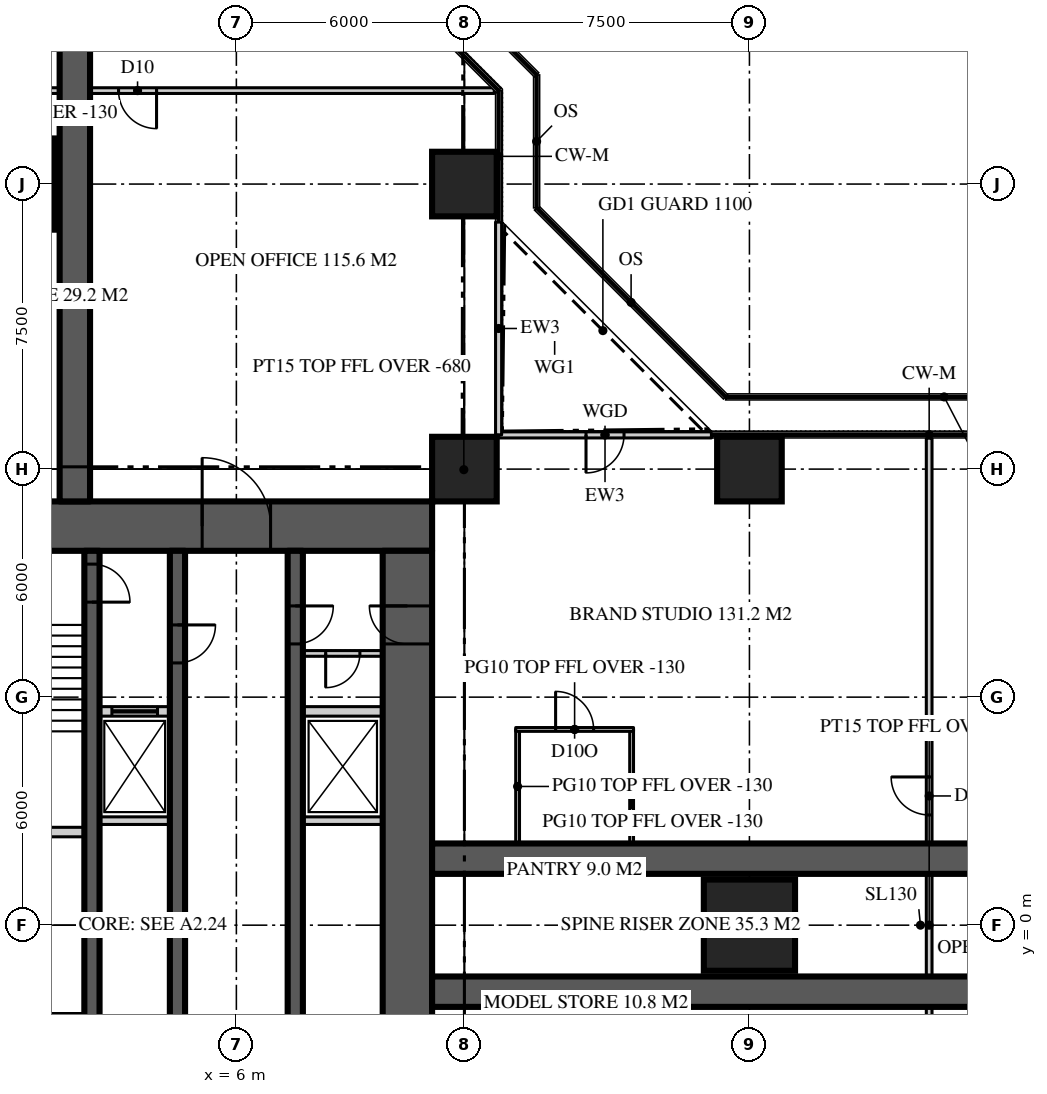
"""IFC4 building model, lengths in metres.
Left out: names, types, materials, properties, quantities, classifications, styles, units other than length and angle.
Written with IfcOpenShell. Run it as: python <this file> out.ifc"""

import sys

from ifc_helpers import new_model, si_unit, direction, frame, frame_2d, origin, origin_2d, place, context, subcontext, project, spatial, rectangle, extrude, element, fill, save


model = new_model("IFC4")
c1 = context("Model", 3, precision=1e-05, world=origin(), true_north=direction((0.0, 1.0)))
c2 = subcontext(c1, "Body", "Model", "MODEL_VIEW")
j1 = project(units=[si_unit("LENGTHUNIT", "METRE"), si_unit("PLANEANGLEUNIT", "RADIAN")], contexts=[c1])
p1 = place(None, origin())
s1 = spatial("IfcSite", under=j1, at=p1, CompositionType="ELEMENT")
p2 = place(p1, origin())
s2 = spatial("IfcBuilding", under=s1, at=p2, CompositionType="ELEMENT")
p3 = place(p2, frame((0.0, 0.0, 186.6)))
s3 = spatial("IfcBuildingStorey", under=s2, at=p3, CompositionType="ELEMENT", Elevation=186.6)
p4 = place(p3, frame((-11.15, 10.5, 0.0), z_axis=(0.0, 0.0, 1.0), x_axis=(1.0, 0.0, 0.0)))
e1 = element("IfcWall", 1, at=p4, inside=s3, PredefinedType="SHEAR", context=c2, shape_type="SweptSolid", body=[
    extrude(rectangle(XDim=22.3, YDim=1.3, at=frame_2d((11.15, 0.0))), origin(), (0.0, 0.0, 1.0), 3.9),
])
p5 = place(p4, frame((4.25, 0.0, 0.0)))
e2 = element("IfcOpeningElement", 2, at=p5, cuts=e1, PredefinedType="OPENING", context=c2, shape_type="SweptSolid", body=[
    extrude(rectangle(XDim=1.8, YDim=2.2, at=frame_2d((0.9, 1.1))), frame((0.0, 0.66, 0.0), z_axis=(0.0, -1.0, 0.0), x_axis=(1.0, 0.0, 0.0)), (0.0, 0.0, 1.0), 1.32),
])
p6 = place(p4, frame((16.25, 0.0, 0.0)))
e3 = element("IfcOpeningElement", 3, at=p6, cuts=e1, PredefinedType="OPENING", context=c2, shape_type="SweptSolid", body=[
    extrude(rectangle(XDim=1.8, YDim=2.2, at=frame_2d((0.9, 1.1))), frame((0.0, 0.66, 0.0), z_axis=(0.0, -1.0, 0.0), x_axis=(1.0, 0.0, 0.0)), (0.0, 0.0, 1.0), 1.32),
])
p7 = place(p3, frame((10.5, -9.85, 0.0), z_axis=(0.0, 0.0, 1.0), x_axis=(0.0, 1.0, 0.0)))
e4 = element("IfcWall", 4, at=p7, inside=s3, PredefinedType="SHEAR", context=c2, shape_type="SweptSolid", body=[
    extrude(rectangle(XDim=19.7, YDim=1.3, at=frame_2d((9.85, 0.0))), origin(), (0.0, 0.0, 1.0), 3.9),
])
p8 = place(p7, frame((17.25, 0.0, 0.0)))
e5 = element("IfcOpeningElement", 5, at=p8, cuts=e4, PredefinedType="OPENING", context=c2, shape_type="SweptSolid", body=[
    extrude(rectangle(XDim=1.0, YDim=2.2, at=frame_2d((0.5, 1.1))), frame((0.0, 0.66, 0.0), z_axis=(0.0, -1.0, 0.0), x_axis=(1.0, 0.0, 0.0)), (0.0, 0.0, 1.0), 1.32),
])
for number, where, z_axis, x_axis in (
    (6, (11.15, -1.75, 0.0), (0.0, 0.0, 1.0), (1.0, 0.0, 0.0)),
    (7, (11.15, 1.75, 0.0), (0.0, 0.0, 1.0), (1.0, 0.0, 0.0)),
    (8, (1.75, 11.15, 0.0), (0.0, 0.0, 1.0), (0.0, 1.0, 0.0)),
):
    element("IfcWall", number, at=place(p3, frame(where, z_axis=z_axis, x_axis=x_axis)), inside=s3, PredefinedType="SHEAR", context=c2, shape_type="SweptSolid", body=[
        extrude(rectangle(XDim=15.25, YDim=0.8, at=frame_2d((7.625, 0.0))), origin(), (0.0, 0.0, 1.0), 3.9),
    ])
p9 = place(p3, frame((19.5, 0.0, 0.0), z_axis=(0.0, 0.0, 1.0), x_axis=(1.0, 0.0, 0.0)))
e9 = element("IfcColumn", 9, at=p9, inside=s3, PredefinedType="COLUMN", context=c2, shape_type="SweptSolid", body=[
    extrude(rectangle(XDim=2.4, YDim=2.4, at=origin_2d()), origin(), (0.0, 0.0, 1.0), 3.9),
])
for number, where, z_axis, x_axis in (
    (10, (12.0, 12.0, 0.0), (0.0, 0.0, 1.0), (1.0, 0.0, 0.0)),
    (11, (19.5, 12.0, 0.0), (0.0, 0.0, 1.0), (1.0, 0.0, 0.0)),
):
    element("IfcColumn", number, at=place(p3, frame(where, z_axis=z_axis, x_axis=x_axis)), inside=s3, PredefinedType="COLUMN", context=c2, shape_type="SweptSolid", body=[
        extrude(rectangle(XDim=1.7, YDim=1.7, at=origin_2d()), origin(), (0.0, 0.0, 1.0), 3.9),
    ])
p10 = place(p3, frame((0.0, 19.5, 0.0), z_axis=(0.0, 0.0, 1.0), x_axis=(1.0, 0.0, 0.0)))
e12 = element("IfcColumn", 12, at=p10, inside=s3, PredefinedType="COLUMN", context=c2, shape_type="SweptSolid", body=[
    extrude(rectangle(XDim=2.4, YDim=2.4, at=origin_2d()), origin(), (0.0, 0.0, 1.0), 3.9),
])
p11 = place(p3, frame((12.0, 19.5, 0.0), z_axis=(0.0, 0.0, 1.0), x_axis=(1.0, 0.0, 0.0)))
e13 = element("IfcColumn", 13, at=p11, inside=s3, PredefinedType="COLUMN", context=c2, shape_type="SweptSolid", body=[
    extrude(rectangle(XDim=1.7, YDim=1.7, at=origin_2d()), origin(), (0.0, 0.0, 1.0), 3.9),
])
p12 = place(p3, frame((18.5, 12.9, 0.0), z_axis=(0.0, 0.0, 1.0), x_axis=(-1.0, 0.0, 0.0)))
e14 = element("IfcWall", 14, at=p12, inside=s3, PredefinedType="SOLIDWALL", context=c2, shape_type="SweptSolid", body=[
    extrude(rectangle(XDim=5.6, YDim=0.16, at=frame_2d((2.8, 0.0))), origin(), (0.0, 0.0, 1.0), 3.77),
])
p13 = place(p12, frame((2.3, 0.0, 0.0)))
e15 = element("IfcOpeningElement", 15, at=p13, cuts=e14, PredefinedType="OPENING", context=c2, shape_type="SweptSolid", body=[
    extrude(rectangle(XDim=1.0, YDim=2.2, at=frame_2d((0.5, 1.1))), frame((0.0, 0.09, 0.0), z_axis=(0.0, -1.0, 0.0), x_axis=(1.0, 0.0, 0.0)), (0.0, 0.0, 1.0), 0.18),
])
p14 = place(p3, frame((12.9, 12.9, 0.0), z_axis=(0.0, 0.0, 1.0), x_axis=(0.0, 1.0, 0.0)))
e16 = element("IfcWall", 16, at=p14, inside=s3, PredefinedType="SOLIDWALL", context=c2, shape_type="SweptSolid", body=[
    extrude(rectangle(XDim=5.6, YDim=0.16, at=frame_2d((2.8, 0.0))), origin(), (0.0, 0.0, 1.0), 3.77),
])
p15 = place(p3, frame((7.55, 9.85, 0.0), z_axis=(0.0, 0.0, 1.0), x_axis=(0.0, -1.0, 0.0)))
e17 = element("IfcWall", 17, at=p15, inside=s3, PredefinedType="SHEAR", context=c2, shape_type="SweptSolid", body=[
    extrude(rectangle(XDim=19.7, YDim=0.4, at=frame_2d((9.85, 0.0))), origin(), (0.0, 0.0, 1.0), 3.9),
])
p16 = place(p15, frame((1.45, 0.0, 0.0)))
e18 = element("IfcOpeningElement", 18, at=p16, cuts=e17, PredefinedType="OPENING", context=c2, shape_type="SweptSolid", body=[
    extrude(rectangle(XDim=1.0, YDim=2.2, at=frame_2d((0.5, 1.1))), frame((0.0, 0.21, 0.0), z_axis=(0.0, -1.0, 0.0), x_axis=(1.0, 0.0, 0.0)), (0.0, 0.0, 1.0), 0.42),
])
p17 = place(p15, frame((17.3, 0.0, 0.0)))
e19 = element("IfcOpeningElement", 19, at=p17, cuts=e17, PredefinedType="OPENING", context=c2, shape_type="SweptSolid", body=[
    extrude(rectangle(XDim=0.9, YDim=2.1, at=frame_2d((0.45, 1.05))), frame((0.0, 0.21, 0.0), z_axis=(0.0, -1.0, 0.0), x_axis=(1.0, 0.0, 0.0)), (0.0, 0.0, 1.0), 0.42),
])
p18 = place(p3, frame((4.45, 9.85, 0.0), z_axis=(0.0, 0.0, 1.0), x_axis=(0.0, -1.0, 0.0)))
e20 = element("IfcWall", 20, at=p18, inside=s3, PredefinedType="SHEAR", context=c2, shape_type="SweptSolid", body=[
    extrude(rectangle(XDim=19.7, YDim=0.4, at=frame_2d((9.85, 0.0))), origin(), (0.0, 0.0, 1.0), 3.9),
])
p19 = place(p18, frame((1.95, 0.0, 0.0)))
e21 = element("IfcOpeningElement", 21, at=p19, cuts=e20, PredefinedType="OPENING", context=c2, shape_type="SweptSolid", body=[
    extrude(rectangle(XDim=1.0, YDim=2.2, at=frame_2d((0.5, 1.1))), frame((0.0, 0.21, 0.0), z_axis=(0.0, -1.0, 0.0), x_axis=(1.0, 0.0, 0.0)), (0.0, 0.0, 1.0), 0.42),
])
p20 = place(p18, frame((17.3, 0.0, 0.0)))
e22 = element("IfcOpeningElement", 22, at=p20, cuts=e20, PredefinedType="OPENING", context=c2, shape_type="SweptSolid", body=[
    extrude(rectangle(XDim=0.9, YDim=2.1, at=frame_2d((0.45, 1.05))), frame((0.0, 0.21, 0.0), z_axis=(0.0, -1.0, 0.0), x_axis=(1.0, 0.0, 0.0)), (0.0, 0.0, 1.0), 0.42),
])
p21 = place(p3, frame((2.2, 9.85, 0.0), z_axis=(0.0, 0.0, 1.0), x_axis=(0.0, -1.0, 0.0)))
e23 = element("IfcWall", 23, at=p21, inside=s3, PredefinedType="SHEAR", context=c2, shape_type="SweptSolid", body=[
    extrude(rectangle(XDim=19.7, YDim=0.4, at=frame_2d((9.85, 0.0))), origin(), (0.0, 0.0, 1.0), 3.9),
])
p22 = place(p21, frame((0.35, 0.0, 0.0)))
e24 = element("IfcOpeningElement", 24, at=p22, cuts=e23, PredefinedType="OPENING", context=c2, shape_type="SweptSolid", body=[
    extrude(rectangle(XDim=1.0, YDim=2.2, at=frame_2d((0.5, 1.1))), frame((0.0, 0.21, 0.0), z_axis=(0.0, -1.0, 0.0), x_axis=(1.0, 0.0, 0.0)), (0.0, 0.0, 1.0), 0.42),
])
p23 = place(p3, frame((2.4, 5.625, 0.0), z_axis=(0.0, 0.0, 1.0), x_axis=(1.0, 0.0, 0.0)))
e25 = element("IfcWall", 25, at=p23, inside=s3, PredefinedType="SOLIDWALL", context=c2, shape_type="SweptSolid", body=[
    extrude(rectangle(XDim=1.85, YDim=0.25, at=frame_2d((0.925, 0.0))), origin(), (0.0, 0.0, 1.0), 3.7),
])
p24 = place(p23, frame((0.325, 0.0, 0.0)))
e26 = element("IfcOpeningElement", 26, at=p24, cuts=e25, PredefinedType="OPENING", context=c2, shape_type="SweptSolid", body=[
    extrude(rectangle(XDim=1.2, YDim=2.2, at=frame_2d((0.6, 1.1))), frame((0.0, 0.135, 0.0), z_axis=(0.0, -1.0, 0.0), x_axis=(1.0, 0.0, 0.0)), (0.0, 0.0, 1.0), 0.27),
])
p25 = place(p3, frame((7.75, 5.625, 0.0), z_axis=(0.0, 0.0, 1.0), x_axis=(1.0, 0.0, 0.0)))
e27 = element("IfcWall", 27, at=p25, inside=s3, PredefinedType="SOLIDWALL", context=c2, shape_type="SweptSolid", body=[
    extrude(rectangle(XDim=2.1, YDim=0.25, at=frame_2d((1.05, 0.0))), origin(), (0.0, 0.0, 1.0), 3.7),
])
for number, where, z_axis, x_axis in (
    (28, (-2.0, -2.45, 0.0), (0.0, 0.0, 1.0), (1.0, 0.0, 0.0)),
    (29, (-2.0, 2.45, 0.0), (0.0, 0.0, 1.0), (1.0, 0.0, 0.0)),
):
    element("IfcWall", number, at=place(p3, frame(where, z_axis=z_axis, x_axis=x_axis)), inside=s3, PredefinedType="SOLIDWALL", context=c2, shape_type="SweptSolid", body=[
        extrude(rectangle(XDim=4.0, YDim=0.25, at=frame_2d((2.0, 0.0))), origin(), (0.0, 0.0, 1.0), 3.7),
    ])
p26 = place(p3, frame((2.4, 2.75, 0.0), z_axis=(0.0, 0.0, 1.0), x_axis=(1.0, 0.0, 0.0)))
e30 = element("IfcWall", 30, at=p26, inside=s3, PredefinedType="SOLIDWALL", context=c2, shape_type="SweptSolid", body=[
    extrude(rectangle(XDim=1.85, YDim=0.2, at=frame_2d((0.925, 0.0))), origin(), (0.0, 0.0, 1.0), 3.7),
])
p27 = place(p3, frame((7.75, 2.75, 0.0), z_axis=(0.0, 0.0, 1.0), x_axis=(1.0, 0.0, 0.0)))
e31 = element("IfcWall", 31, at=p27, inside=s3, PredefinedType="SOLIDWALL", context=c2, shape_type="SweptSolid", body=[
    extrude(rectangle(XDim=2.1, YDim=0.2, at=frame_2d((1.05, 0.0))), origin(), (0.0, 0.0, 1.0), 3.7),
])
p28 = place(p3, frame((24.229, -12.82, 0.0), z_axis=(0.0, 0.0, 1.0), x_axis=(0.0, 1.0, 0.0)))
e32 = element("IfcWall", 32, at=p28, inside=s3, PredefinedType="PARTITIONING", context=c2, shape_type="SweptSolid", body=[
    extrude(rectangle(XDim=25.64, YDim=0.15, at=frame_2d((12.82, 0.0))), origin(), (0.0, 0.0, 1.0), 3.77),
])
p29 = place(p28, frame((15.72, 0.0, 0.0)))
e33 = element("IfcOpeningElement", 33, at=p29, cuts=e32, PredefinedType="OPENING", context=c2, shape_type="SweptSolid", body=[
    extrude(rectangle(XDim=1.0, YDim=2.2, at=frame_2d((0.5, 1.1))), frame((0.0, 0.085, 0.0), z_axis=(0.0, -1.0, 0.0), x_axis=(1.0, 0.0, 0.0)), (0.0, 0.0, 1.0), 0.17),
])
p30 = place(p28, frame((8.92, 0.0, 0.0)))
e34 = element("IfcOpeningElement", 34, at=p30, cuts=e32, PredefinedType="OPENING", context=c2, shape_type="SweptSolid", body=[
    extrude(rectangle(XDim=1.0, YDim=2.2, at=frame_2d((0.5, 1.1))), frame((0.0, 0.085, 0.0), z_axis=(0.0, -1.0, 0.0), x_axis=(1.0, 0.0, 0.0)), (0.0, 0.0, 1.0), 0.17),
])
for number, where, z_axis, x_axis in (
    (35, (13.4, 2.15, 0.0), (0.0, 0.0, 1.0), (0.0, 1.0, 0.0)),
    (36, (16.4, 2.15, 0.0), (0.0, 0.0, 1.0), (0.0, 1.0, 0.0)),
):
    element("IfcWall", number, at=place(p3, frame(where, z_axis=z_axis, x_axis=x_axis)), inside=s3, PredefinedType="PARTITIONING", context=c2, shape_type="SweptSolid", body=[
        extrude(rectangle(XDim=3.0, YDim=0.1, at=frame_2d((1.5, 0.0))), origin(), (0.0, 0.0, 1.0), 3.77),
    ])
p31 = place(p3, frame((13.35, 5.15, 0.0), z_axis=(0.0, 0.0, 1.0), x_axis=(1.0, 0.0, 0.0)))
e37 = element("IfcWall", 37, at=p31, inside=s3, PredefinedType="PARTITIONING", context=c2, shape_type="SweptSolid", body=[
    extrude(rectangle(XDim=3.1, YDim=0.1, at=frame_2d((1.55, 0.0))), origin(), (0.0, 0.0, 1.0), 3.77),
])
p32 = place(p31, frame((1.05, 0.0, 0.0)))
e38 = element("IfcOpeningElement", 38, at=p32, cuts=e37, PredefinedType="OPENING", context=c2, shape_type="SweptSolid", body=[
    extrude(rectangle(XDim=1.0, YDim=2.2, at=frame_2d((0.5, 1.1))), frame((0.0, 0.06, 0.0), z_axis=(0.0, -1.0, 0.0), x_axis=(1.0, 0.0, 0.0)), (0.0, 0.0, 1.0), 0.12),
])
for number, where, z_axis, x_axis in (
    (39, (13.4, -2.15, 0.0), (0.0, 0.0, 1.0), (0.0, -1.0, 0.0)),
    (40, (17.0, -2.15, 0.0), (0.0, 0.0, 1.0), (0.0, -1.0, 0.0)),
):
    element("IfcWall", number, at=place(p3, frame(where, z_axis=z_axis, x_axis=x_axis)), inside=s3, PredefinedType="PARTITIONING", context=c2, shape_type="SweptSolid", body=[
        extrude(rectangle(XDim=3.0, YDim=0.1, at=frame_2d((1.5, 0.0))), origin(), (0.0, 0.0, 1.0), 3.77),
    ])
p33 = place(p3, frame((12.786, 21.959, 0.0), z_axis=(0.0, 0.0, 1.0), x_axis=(-1.0, 0.0, 0.0)))
e41 = element("IfcWall", 41, at=p33, inside=s3, PredefinedType="PARTITIONING", context=c2, shape_type="SweptSolid", body=[
    extrude(rectangle(XDim=25.573, YDim=0.15, at=frame_2d((12.786, 0.0))), origin(), (0.0, 0.0, 1.0), 3.77),
])
p34 = place(p33, frame((15.687, 0.0, 0.0)))
e42 = element("IfcOpeningElement", 42, at=p34, cuts=e41, PredefinedType="OPENING", context=c2, shape_type="SweptSolid", body=[
    extrude(rectangle(XDim=1.0, YDim=2.2, at=frame_2d((0.5, 1.1))), frame((0.0, 0.085, 0.0), z_axis=(0.0, -1.0, 0.0), x_axis=(1.0, 0.0, 0.0)), (0.0, 0.0, 1.0), 0.17),
])
p35 = place(p33, frame((8.886, 0.0, 0.0)))
e43 = element("IfcOpeningElement", 43, at=p35, cuts=e41, PredefinedType="OPENING", context=c2, shape_type="SweptSolid", body=[
    extrude(rectangle(XDim=1.0, YDim=2.2, at=frame_2d((0.5, 1.1))), frame((0.0, 0.085, 0.0), z_axis=(0.0, -1.0, 0.0), x_axis=(1.0, 0.0, 0.0)), (0.0, 0.0, 1.0), 0.17),
])
p36 = place(p3, frame((11.15, 11.15, 0.0), z_axis=(0.0, 0.0, 1.0), x_axis=(0.707106781187, 0.707106781187, 0.0)))
e44 = element("IfcWall", 44, at=p36, inside=s3, PredefinedType="PARTITIONING", context=c2, shape_type="SweptSolid", body=[
    extrude(rectangle(XDim=2.362, YDim=0.15, at=frame_2d((1.181, 0.0))), origin(), (0.0, 0.0, 1.0), 3.22),
])
p37 = place(p3, frame((9.85, 7.15, 0.0), z_axis=(0.0, 0.0, 1.0), x_axis=(-1.0, 0.0, 0.0)))
e45 = element("IfcWall", 45, at=p37, inside=s3, PredefinedType="SOLIDWALL", context=c2, shape_type="SweptSolid", body=[
    extrude(rectangle(XDim=2.1, YDim=0.15, at=frame_2d((1.05, 0.0))), origin(), (0.0, 0.0, 1.0), 3.77),
])
p38 = place(p37, frame((0.6, 0.0, 0.0)))
e46 = element("IfcOpeningElement", 46, at=p38, cuts=e45, PredefinedType="OPENING", context=c2, shape_type="SweptSolid", body=[
    extrude(rectangle(XDim=0.9, YDim=2.1, at=frame_2d((0.45, 1.05))), frame((0.0, 0.085, 0.0), z_axis=(0.0, -1.0, 0.0), x_axis=(1.0, 0.0, 0.0)), (0.0, 0.0, 1.0), 0.17),
])
p39 = place(p13, origin())
e47 = element("IfcDoor", 47, at=p39, inside=s3, OperationType="SINGLE_SWING_RIGHT", PredefinedType="DOOR", context=c2, shape_type="SweptSolid", body=[
    extrude(rectangle(XDim=1.0, YDim=2.2, at=frame_2d((0.5, 1.1))), frame((0.0, 0.025, 0.0), z_axis=(0.0, -1.0, 0.0), x_axis=(1.0, 0.0, 0.0)), (0.0, 0.0, 1.0), 0.05),
])
fill(e15, e47)
p40 = place(p6, origin())
e48 = element("IfcDoor", 48, at=p40, inside=s3, OperationType="DOUBLE_DOOR_DOUBLE_SWING", PredefinedType="DOOR", context=c2, shape_type="SweptSolid", body=[
    extrude(rectangle(XDim=1.8, YDim=2.2, at=frame_2d((0.9, 1.1))), frame((0.0, 0.025, 0.0), z_axis=(0.0, -1.0, 0.0), x_axis=(1.0, 0.0, 0.0)), (0.0, 0.0, 1.0), 0.05),
])
fill(e3, e48)
p41 = place(p16, origin())
e49 = element("IfcDoor", 49, at=p41, inside=s3, OperationType="SINGLE_SWING_LEFT", PredefinedType="DOOR", context=c2, shape_type="SweptSolid", body=[
    extrude(rectangle(XDim=1.0, YDim=2.2, at=frame_2d((0.5, 1.1))), frame((0.0, 0.025, 0.0), z_axis=(0.0, -1.0, 0.0), x_axis=(1.0, 0.0, 0.0)), (0.0, 0.0, 1.0), 0.05),
])
fill(e18, e49)
p42 = place(p8, origin())
e50 = element("IfcDoor", 50, at=p42, inside=s3, OperationType="SINGLE_SWING_RIGHT", PredefinedType="DOOR", context=c2, shape_type="SweptSolid", body=[
    extrude(rectangle(XDim=1.0, YDim=2.2, at=frame_2d((0.5, 1.1))), frame((0.0, 0.025, 0.0), z_axis=(0.0, -1.0, 0.0), x_axis=(1.0, 0.0, 0.0)), (0.0, 0.0, 1.0), 0.05),
])
fill(e5, e50)
p43 = place(p19, origin())
e51 = element("IfcDoor", 51, at=p43, inside=s3, OperationType="SINGLE_SWING_LEFT", PredefinedType="DOOR", context=c2, shape_type="SweptSolid", body=[
    extrude(rectangle(XDim=1.0, YDim=2.2, at=frame_2d((0.5, 1.1))), frame((0.0, 0.025, 0.0), z_axis=(0.0, -1.0, 0.0), x_axis=(1.0, 0.0, 0.0)), (0.0, 0.0, 1.0), 0.05),
])
fill(e21, e51)
p44 = place(p22, origin())
e52 = element("IfcDoor", 52, at=p44, inside=s3, OperationType="SINGLE_SWING_RIGHT", PredefinedType="DOOR", context=c2, shape_type="SweptSolid", body=[
    extrude(rectangle(XDim=1.0, YDim=2.2, at=frame_2d((0.5, 1.1))), frame((0.0, 0.025, 0.0), z_axis=(0.0, -1.0, 0.0), x_axis=(1.0, 0.0, 0.0)), (0.0, 0.0, 1.0), 0.05),
])
fill(e24, e52)
p45 = place(p24, origin())
e53 = element("IfcDoor", 53, at=p45, inside=s3, OperationType="SLIDING_TO_LEFT", PredefinedType="DOOR", context=c2, shape_type="SweptSolid", body=[
    extrude(rectangle(XDim=1.2, YDim=2.2, at=frame_2d((0.6, 1.1))), frame((0.0, 0.025, 0.0), z_axis=(0.0, -1.0, 0.0), x_axis=(1.0, 0.0, 0.0)), (0.0, 0.0, 1.0), 0.05),
])
fill(e26, e53)
p46 = place(p29, origin())
e54 = element("IfcDoor", 54, at=p46, inside=s3, OperationType="SINGLE_SWING_RIGHT", PredefinedType="DOOR", context=c2, shape_type="SweptSolid", body=[
    extrude(rectangle(XDim=1.0, YDim=2.2, at=frame_2d((0.5, 1.1))), frame((0.0, 0.025, 0.0), z_axis=(0.0, -1.0, 0.0), x_axis=(1.0, 0.0, 0.0)), (0.0, 0.0, 1.0), 0.05),
])
fill(e33, e54)
p47 = place(p32, origin())
e55 = element("IfcDoor", 55, at=p47, inside=s3, OperationType="SINGLE_SWING_LEFT", PredefinedType="DOOR", context=c2, shape_type="SweptSolid", body=[
    extrude(rectangle(XDim=1.0, YDim=2.2, at=frame_2d((0.5, 1.1))), frame((0.0, 0.025, 0.0), z_axis=(0.0, -1.0, 0.0), x_axis=(1.0, 0.0, 0.0)), (0.0, 0.0, 1.0), 0.05),
])
fill(e38, e55)
p48 = place(p35, origin())
e56 = element("IfcDoor", 56, at=p48, inside=s3, OperationType="SINGLE_SWING_LEFT", PredefinedType="DOOR", context=c2, shape_type="SweptSolid", body=[
    extrude(rectangle(XDim=1.0, YDim=2.2, at=frame_2d((0.5, 1.1))), frame((0.0, 0.025, 0.0), z_axis=(0.0, -1.0, 0.0), x_axis=(1.0, 0.0, 0.0)), (0.0, 0.0, 1.0), 0.05),
])
fill(e43, e56)
p49 = place(p38, origin())
e57 = element("IfcDoor", 57, at=p49, inside=s3, OperationType="SINGLE_SWING_RIGHT", PredefinedType="DOOR", context=c2, shape_type="SweptSolid", body=[
    extrude(rectangle(XDim=0.9, YDim=2.1, at=frame_2d((0.45, 1.05))), frame((0.0, 0.025, 0.0), z_axis=(0.0, -1.0, 0.0), x_axis=(1.0, 0.0, 0.0)), (0.0, 0.0, 1.0), 0.05),
])
fill(e46, e57)
save(model, sys.argv[1])
